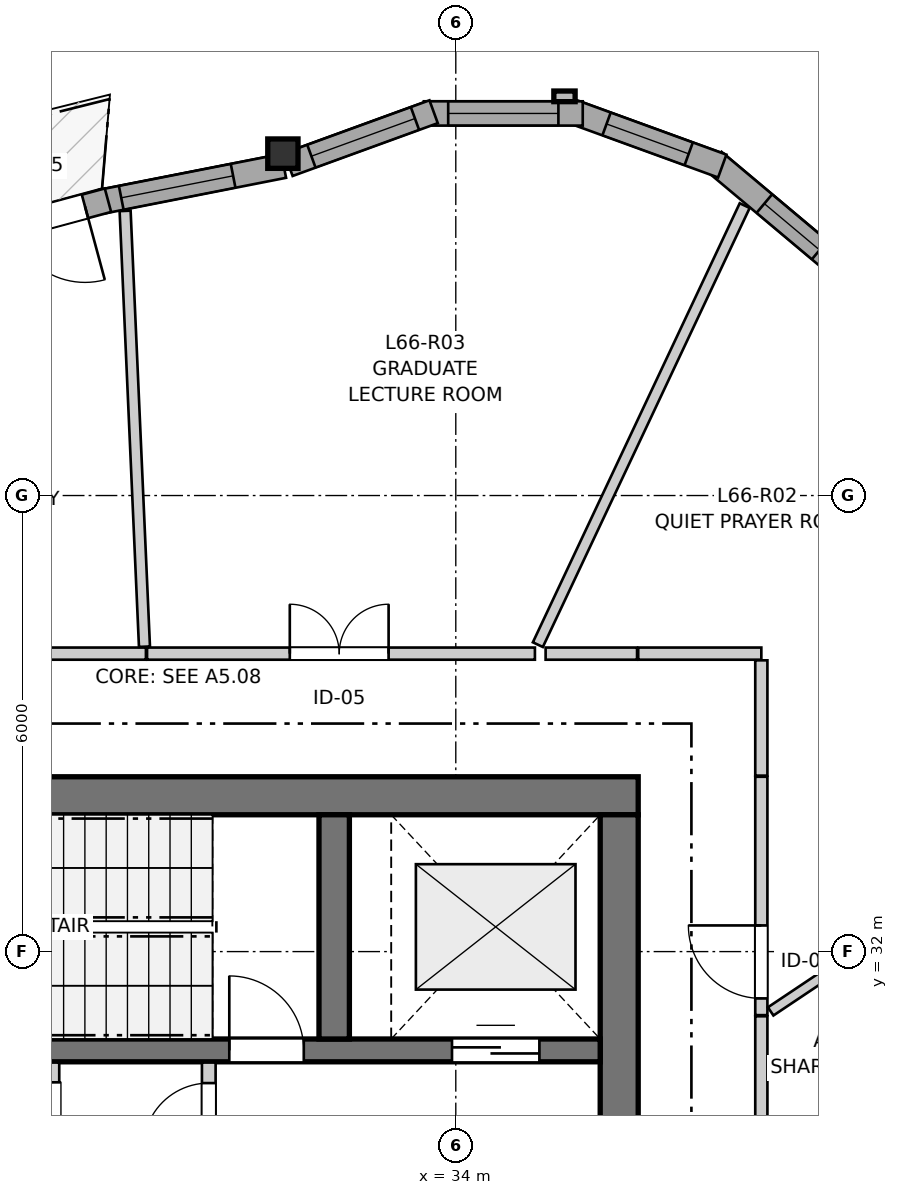
"""IFC4 building model, lengths in metres.
Left out: names, types, materials, properties, quantities, classifications, styles, units other than length and angle.
Written with IfcOpenShell. Run it as: python <this file> out.ifc"""

import sys

from ifc_helpers import new_model, si_unit, direction, frame, frame_2d, origin, origin_2d, place, context, subcontext, project, spatial, rectangle, i_section, extrude, source, transform, mapped, element, fill, save


model = new_model("IFC4")
c1 = context("Model", 3, precision=1e-05, world=origin(), true_north=direction((0.0, 1.0)))
c2 = subcontext(c1, "Body", "Model", "MODEL_VIEW")
j1 = project(units=[si_unit("LENGTHUNIT", "METRE"), si_unit("PLANEANGLEUNIT", "RADIAN")], contexts=[c1])
p1 = place(None, origin())
s1 = spatial("IfcSite", under=j1, at=p1, CompositionType="ELEMENT")
p2 = place(p1, origin())
s2 = spatial("IfcBuilding", under=s1, at=p2, CompositionType="ELEMENT")
p3 = place(p2, frame((0.0, 0.0, 221.2)))
s3 = spatial("IfcBuildingStorey", under=s2, at=p3, CompositionType="ELEMENT", Elevation=221.2)
p4 = place(p3, frame((36.4, 34.05, 0.0), z_axis=(0.0, 0.0, 1.0), x_axis=(-1.0, 0.0, 0.0)))
e1 = element("IfcWall", 1, at=p4, inside=s3, PredefinedType="SHEAR", context=c2, shape_type="SweptSolid", body=[
    extrude(rectangle(XDim=12.1, YDim=0.5, at=frame_2d((6.05, 0.0))), origin(), (0.0, 0.0, 1.0), 2.96),
])
p5 = place(p3, frame((36.15, 18.2, 0.0), z_axis=(0.0, 0.0, 1.0), x_axis=(0.0, 1.0, 0.0)))
e2 = element("IfcWall", 2, at=p5, inside=s3, PredefinedType="SHEAR", context=c2, shape_type="SweptSolid", body=[
    extrude(rectangle(XDim=15.6, YDim=0.5, at=frame_2d((7.8, 0.0))), origin(), (0.0, 0.0, 1.0), 2.96),
])
p6 = place(p5, frame((4.25, 0.0, 0.0)))
e3 = element("IfcOpeningElement", 3, at=p6, cuts=e2, PredefinedType="OPENING", context=c2, shape_type="SweptSolid", body=[
    extrude(rectangle(XDim=1.1, YDim=2.15, at=frame_2d((0.55, 1.075))), frame((0.0, 0.26, 0.0), z_axis=(0.0, -1.0, 0.0), x_axis=(1.0, 0.0, 0.0)), (0.0, 0.0, 1.0), 0.52),
])
p7 = place(p5, frame((10.25, 0.0, 0.0)))
e4 = element("IfcOpeningElement", 4, at=p7, cuts=e2, PredefinedType="OPENING", context=c2, shape_type="SweptSolid", body=[
    extrude(rectangle(XDim=1.1, YDim=2.15, at=frame_2d((0.55, 1.075))), frame((0.0, 0.26, 0.0), z_axis=(0.0, -1.0, 0.0), x_axis=(1.0, 0.0, 0.0)), (0.0, 0.0, 1.0), 0.52),
])
p8 = place(p3, frame((24.8, 30.7, 0.0), z_axis=(0.0, 0.0, 1.0), x_axis=(1.0, 0.0, 0.0)))
e5 = element("IfcWall", 5, at=p8, inside=s3, PredefinedType="SHEAR", context=c2, shape_type="SweptSolid", body=[
    extrude(rectangle(XDim=11.1, YDim=0.3, at=frame_2d((5.55, 0.0))), origin(), (0.0, 0.0, 1.0), 2.96),
])
p9 = place(p8, frame((6.22, 0.0, 0.0)))
e6 = element("IfcOpeningElement", 6, at=p9, cuts=e5, PredefinedType="OPENING", context=c2, shape_type="SweptSolid", body=[
    extrude(rectangle(XDim=0.98, YDim=2.15, at=frame_2d((0.49, 1.075))), frame((0.0, 0.16, 0.0), z_axis=(0.0, -1.0, 0.0), x_axis=(1.0, 0.0, 0.0)), (0.0, 0.0, 1.0), 0.32),
])
p10 = place(p8, frame((9.15, 0.0, 0.0)))
e7 = element("IfcOpeningElement", 7, at=p10, cuts=e5, PredefinedType="OPENING", context=c2, shape_type="SweptSolid", body=[
    extrude(rectangle(XDim=1.15, YDim=2.15, at=frame_2d((0.575, 1.075))), frame((0.0, 0.16, 0.0), z_axis=(0.0, -1.0, 0.0), x_axis=(1.0, 0.0, 0.0)), (0.0, 0.0, 1.0), 0.32),
])
p11 = place(p3, frame((32.4, 30.85, 0.0), z_axis=(0.0, 0.0, 1.0), x_axis=(0.0, 1.0, 0.0)))
e8 = element("IfcWall", 8, at=p11, inside=s3, PredefinedType="SHEAR", context=c2, shape_type="SweptSolid", body=[
    extrude(rectangle(XDim=2.95, YDim=0.4, at=frame_2d((1.475, 0.0))), origin(), (0.0, 0.0, 1.0), 2.96),
])
m1 = source(origin(), c2, "Body", "SweptSolid", [
    extrude(i_section(OverallWidth=0.398, OverallDepth=0.387, WebThickness=0.019, FlangeThickness=0.03, FilletRadius=0.015, at=origin_2d()), origin(), (0.0, 0.0, 1.0), 2.96),
])
p12 = place(p3, frame((31.725, 42.498, 0.0), z_axis=(0.0, 0.0, 1.0), x_axis=(1.0, 0.0, 0.0)))
e9 = element("IfcColumn", 9, at=p12, inside=s3, PredefinedType="PILASTER", context=c2, shape_type="MappedRepresentation", body=[
    mapped(m1, transform((0.0, 0.0, 0.0), x_axis=(1.0, 0.0, 0.0), y_axis=(0.0, 1.0, 0.0), z_axis=(0.0, 0.0, 1.0), scale=1.0)),
])
p13 = place(p3, frame((38.994, 41.056, 0.0), z_axis=(0.0, 0.0, 1.0), x_axis=(-0.766024572719, 0.642811289563, 0.0)))
e10 = element("IfcWall", 10, at=p13, inside=s3, PredefinedType="SOLIDWALL", context=c2, shape_type="SweptSolid", body=[
    extrude(rectangle(XDim=2.09, YDim=0.32, at=frame_2d((1.045, 0.0))), origin(), (0.0, 0.0, 1.0), 2.58),
])
p14 = place(p13, frame((0.271, 0.0, 0.82)))
e11 = element("IfcOpeningElement", 11, at=p14, cuts=e10, PredefinedType="OPENING", context=c2, shape_type="SweptSolid", body=[
    extrude(rectangle(XDim=0.95, YDim=1.35, at=frame_2d((0.475, 0.675))), frame((0.0, 0.17, 0.0), z_axis=(0.0, -1.0, 0.0), x_axis=(1.0, 0.0, 0.0)), (0.0, 0.0, 1.0), 0.34),
])
p15 = place(p3, frame((37.506, 42.334, 0.0), z_axis=(0.0, 0.0, 1.0), x_axis=(-0.939711556618, 0.341968113072, 0.0)))
e12 = element("IfcWall", 12, at=p15, inside=s3, PredefinedType="SOLIDWALL", context=c2, shape_type="SweptSolid", body=[
    extrude(rectangle(XDim=2.09, YDim=0.32, at=frame_2d((1.045, 0.0))), origin(), (0.0, 0.0, 1.0), 2.58),
])
p16 = place(p15, frame((0.47, 0.0, 0.82)))
e13 = element("IfcOpeningElement", 13, at=p16, cuts=e12, PredefinedType="OPENING", context=c2, shape_type="SweptSolid", body=[
    extrude(rectangle(XDim=1.15, YDim=1.2, at=frame_2d((0.575, 0.6))), frame((0.0, 0.17, 0.0), z_axis=(0.0, -1.0, 0.0), x_axis=(1.0, 0.0, 0.0)), (0.0, 0.0, 1.0), 0.34),
])
p17 = place(p3, frame((35.67, 43.027, 0.0), z_axis=(0.0, 0.0, 1.0), x_axis=(-1.0, 0.0, 0.0)))
e14 = element("IfcWall", 14, at=p17, inside=s3, PredefinedType="SOLIDWALL", context=c2, shape_type="SweptSolid", body=[
    extrude(rectangle(XDim=2.09, YDim=0.32, at=frame_2d((1.045, 0.0))), origin(), (0.0, 0.0, 1.0), 2.58),
])
p18 = place(p17, frame((0.32, 0.0, 0.82)))
e15 = element("IfcOpeningElement", 15, at=p18, cuts=e14, PredefinedType="OPENING", context=c2, shape_type="SweptSolid", body=[
    extrude(rectangle(XDim=1.45, YDim=1.25, at=frame_2d((0.725, 0.625))), frame((0.0, 0.17, 0.0), z_axis=(0.0, -1.0, 0.0), x_axis=(1.0, 0.0, 0.0)), (0.0, 0.0, 1.0), 0.34),
])
p19 = place(p3, frame((33.708, 43.049, 0.0), z_axis=(0.0, 0.0, 1.0), x_axis=(-0.939691662178, -0.342022777067, 0.0)))
e16 = element("IfcWall", 16, at=p19, inside=s3, PredefinedType="SOLIDWALL", context=c2, shape_type="SweptSolid", body=[
    extrude(rectangle(XDim=2.032, YDim=0.32, at=frame_2d((1.016, 0.0))), origin(), (0.0, 0.0, 1.0), 2.58),
])
p20 = place(p19, frame((0.261, 0.0, 0.82)))
e17 = element("IfcOpeningElement", 17, at=p20, cuts=e16, PredefinedType="OPENING", context=c2, shape_type="SweptSolid", body=[
    extrude(rectangle(XDim=1.45, YDim=1.25, at=frame_2d((0.725, 0.625))), frame((0.0, 0.17, 0.0), z_axis=(0.0, -1.0, 0.0), x_axis=(1.0, 0.0, 0.0)), (0.0, 0.0, 1.0), 0.34),
])
p21 = place(p3, frame((31.736, 42.337, 0.0), z_axis=(0.0, 0.0, 1.0), x_axis=(-0.981228566979, -0.192848384345, 0.0)))
e18 = element("IfcWall", 18, at=p21, inside=s3, PredefinedType="SOLIDWALL", context=c2, shape_type="SweptSolid", body=[
    extrude(rectangle(XDim=2.443, YDim=0.32, at=frame_2d((1.222, 0.0))), origin(), (0.0, 0.0, 1.0), 2.58),
])
p22 = place(p21, frame((0.679, 0.0, 0.82)))
e19 = element("IfcOpeningElement", 19, at=p22, cuts=e18, PredefinedType="OPENING", context=c2, shape_type="SweptSolid", body=[
    extrude(rectangle(XDim=1.5, YDim=1.45, at=frame_2d((0.75, 0.725))), frame((0.0, 0.17, 0.0), z_axis=(0.0, -1.0, 0.0), x_axis=(1.0, 0.0, 0.0)), (0.0, 0.0, 1.0), 0.34),
])
p23 = place(p3, frame((29.424, 41.885, 0.0), z_axis=(0.0, 0.0, 1.0), x_axis=(-0.965461343217, -0.260546338976, 0.0)))
e20 = element("IfcWall", 20, at=p23, inside=s3, PredefinedType="SOLIDWALL", context=c2, shape_type="SweptSolid", body=[
    extrude(rectangle(XDim=2.323, YDim=0.32, at=frame_2d((1.162, 0.0))), origin(), (0.0, 0.0, 1.0), 2.58),
])
p24 = place(p23, frame((0.313, 0.0, 0.0)))
e21 = element("IfcOpeningElement", 21, at=p24, cuts=e20, PredefinedType="OPENING", context=c2, shape_type="SweptSolid", body=[
    extrude(rectangle(XDim=1.0, YDim=2.1, at=frame_2d((0.5, 1.05))), frame((0.0, 0.17, 0.0), z_axis=(0.0, -1.0, 0.0), x_axis=(1.0, 0.0, 0.0)), (0.0, 0.0, 1.0), 0.34),
])
p25 = place(p3, frame((30.75, 27.43, 0.0), z_axis=(0.0, 0.0, 1.0), x_axis=(0.0, 1.0, 0.0)))
e22 = element("IfcWall", 22, at=p25, inside=s3, PredefinedType="PARTITIONING", context=c2, shape_type="SweptSolid", body=[
    extrude(rectangle(XDim=3.11, YDim=0.18, at=frame_2d((1.555, 0.0))), origin(), (0.0, 0.0, 1.0), 2.96),
])
p26 = place(p25, frame((1.98, 0.0, 0.0)))
e23 = element("IfcOpeningElement", 23, at=p26, cuts=e22, PredefinedType="OPENING", context=c2, shape_type="SweptSolid", body=[
    extrude(rectangle(XDim=0.86, YDim=2.05, at=frame_2d((0.43, 1.025))), frame((0.0, 0.1, 0.0), z_axis=(0.0, -1.0, 0.0), x_axis=(1.0, 0.0, 0.0)), (0.0, 0.0, 1.0), 0.2),
])
p27 = place(p3, frame((28.725, 29.16, 0.0), z_axis=(0.0, 0.0, 1.0), x_axis=(0.0, 1.0, 0.0)))
e24 = element("IfcWall", 24, at=p27, inside=s3, PredefinedType="PARTITIONING", context=c2, shape_type="SweptSolid", body=[
    extrude(rectangle(XDim=1.38, YDim=0.115, at=frame_2d((0.69, 0.0))), origin(), (0.0, 0.0, 1.0), 2.96),
])
p28 = place(p27, frame((0.26, 0.0, 0.0)))
e25 = element("IfcOpeningElement", 25, at=p28, cuts=e24, PredefinedType="OPENING", context=c2, shape_type="SweptSolid", body=[
    extrude(rectangle(XDim=0.86, YDim=2.05, at=frame_2d((0.43, 1.025))), frame((0.0, 0.067, 0.0), z_axis=(0.0, -1.0, 0.0), x_axis=(1.0, 0.0, 0.0)), (0.0, 0.0, 1.0), 0.135),
])
p29 = place(p3, frame((24.3, 35.92, 0.0), z_axis=(0.0, 0.0, 1.0), x_axis=(1.0, 0.0, 0.0)))
e26 = element("IfcWall", 26, at=p29, inside=s3, PredefinedType="PARTITIONING", context=c2, shape_type="SweptSolid", body=[
    extrude(rectangle(XDim=5.623, YDim=0.16, at=frame_2d((2.812, 0.0))), origin(), (0.0, 0.0, 1.0), 2.96),
])
p30 = place(p29, frame((0.22, 0.0, 0.0)))
e27 = element("IfcOpeningElement", 27, at=p30, cuts=e26, PredefinedType="OPENING", context=c2, shape_type="SweptSolid", body=[
    extrude(rectangle(XDim=0.96, YDim=2.1, at=frame_2d((0.48, 1.05))), frame((0.0, 0.09, 0.0), z_axis=(0.0, -1.0, 0.0), x_axis=(1.0, 0.0, 0.0)), (0.0, 0.0, 1.0), 0.18),
])
p31 = place(p3, frame((29.938, 35.92, 0.0), z_axis=(0.0, 0.0, 1.0), x_axis=(1.0, 0.0, 0.0)))
e28 = element("IfcWall", 28, at=p31, inside=s3, PredefinedType="PARTITIONING", context=c2, shape_type="SweptSolid", body=[
    extrude(rectangle(XDim=5.103, YDim=0.16, at=frame_2d((2.552, 0.0))), origin(), (0.0, 0.0, 1.0), 2.96),
])
p32 = place(p31, frame((1.878, 0.0, 0.0)))
e29 = element("IfcOpeningElement", 29, at=p32, cuts=e28, PredefinedType="OPENING", context=c2, shape_type="SweptSolid", body=[
    extrude(rectangle(XDim=1.3, YDim=2.1, at=frame_2d((0.65, 1.05))), frame((0.0, 0.09, 0.0), z_axis=(0.0, -1.0, 0.0), x_axis=(1.0, 0.0, 0.0)), (0.0, 0.0, 1.0), 0.18),
])
p33 = place(p3, frame((38.02, 31.149, 0.0), z_axis=(0.0, 0.0, 1.0), x_axis=(0.0, -1.0, 0.0)))
e30 = element("IfcWall", 30, at=p33, inside=s3, PredefinedType="PARTITIONING", context=c2, shape_type="SweptSolid", body=[
    extrude(rectangle(XDim=3.279, YDim=0.16, at=frame_2d((1.639, 0.0))), origin(), (0.0, 0.0, 1.0), 2.628),
])
p34 = place(p33, frame((2.109, 0.0, 0.0)))
e31 = element("IfcOpeningElement", 31, at=p34, cuts=e30, PredefinedType="OPENING", context=c2, shape_type="SweptSolid", body=[
    extrude(rectangle(XDim=0.95, YDim=2.1, at=frame_2d((0.475, 1.05))), frame((0.0, 0.09, 0.0), z_axis=(0.0, -1.0, 0.0), x_axis=(1.0, 0.0, 0.0)), (0.0, 0.0, 1.0), 0.18),
])
p35 = place(p3, frame((38.02, 31.164, 0.0), z_axis=(0.0, 0.0, 1.0), x_axis=(0.0, 1.0, 0.0)))
e32 = element("IfcWall", 32, at=p35, inside=s3, PredefinedType="PARTITIONING", context=c2, shape_type="SweptSolid", body=[
    extrude(rectangle(XDim=3.136, YDim=0.16, at=frame_2d((1.568, 0.0))), origin(), (0.0, 0.0, 1.0), 2.628),
])
p36 = place(p35, frame((0.22, 0.0, 0.0)))
e33 = element("IfcOpeningElement", 33, at=p36, cuts=e32, PredefinedType="OPENING", context=c2, shape_type="SweptSolid", body=[
    extrude(rectangle(XDim=0.96, YDim=2.1, at=frame_2d((0.48, 1.05))), frame((0.0, 0.09, 0.0), z_axis=(0.0, -1.0, 0.0), x_axis=(1.0, 0.0, 0.0)), (0.0, 0.0, 1.0), 0.18),
])
p37 = place(p3, frame((35.08, 36.038, 0.0), z_axis=(0.0, 0.0, 1.0), x_axis=(0.426214985607, 0.904621902258, 0.0)))
e34 = element("IfcWall", 34, at=p37, inside=s3, PredefinedType="PARTITIONING", context=c2, shape_type="SweptSolid", body=[
    extrude(rectangle(XDim=6.385, YDim=0.145, at=frame_2d((3.192, 0.0))), origin(), (0.0, 0.0, 1.0), 2.96),
])
p38 = place(p3, frame((29.649, 41.745, 0.0), z_axis=(0.0, 0.0, 1.0), x_axis=(0.044327022296, -0.999017074476, 0.0)))
e35 = element("IfcWall", 35, at=p38, inside=s3, PredefinedType="PARTITIONING", context=c2, shape_type="SweptSolid", body=[
    extrude(rectangle(XDim=5.739, YDim=0.145, at=frame_2d((2.87, 0.0))), origin(), (0.0, 0.0, 1.0), 2.96),
])
p39 = place(p3, frame((38.143, 31.213, 0.0), z_axis=(0.0, 0.0, 1.0), x_axis=(0.831154063558, 0.556042195009, 0.0)))
e36 = element("IfcWall", 36, at=p39, inside=s3, PredefinedType="PARTITIONING", context=c2, shape_type="SweptSolid", body=[
    extrude(rectangle(XDim=3.86, YDim=0.13, at=frame_2d((1.93, 0.0))), origin(), (0.0, 0.0, 1.0), 2.96),
])
p40 = place(p3, frame((36.4, 35.92, 0.0), z_axis=(0.0, 0.0, 1.0), x_axis=(1.0, 0.0, 0.0)))
e37 = element("IfcWall", 37, at=p40, inside=s3, PredefinedType="PARTITIONING", context=c2, shape_type="SweptSolid", body=[
    extrude(rectangle(XDim=1.62, YDim=0.16, at=frame_2d((0.81, 0.0))), origin(), (0.0, 0.0, 1.0), 2.598),
])
p41 = place(p3, frame((38.02, 34.315, 0.0), z_axis=(0.0, 0.0, 1.0), x_axis=(0.0, 1.0, 0.0)))
e38 = element("IfcWall", 38, at=p41, inside=s3, PredefinedType="PARTITIONING", context=c2, shape_type="SweptSolid", body=[
    extrude(rectangle(XDim=1.517, YDim=0.16, at=frame_2d((0.759, 0.0))), origin(), (0.0, 0.0, 1.0), 2.96),
])
p42 = place(p3, frame((35.182, 35.92, 0.0), z_axis=(0.0, 0.0, 1.0), x_axis=(1.0, 0.0, 0.0)))
e39 = element("IfcWall", 39, at=p42, inside=s3, PredefinedType="PARTITIONING", context=c2, shape_type="SweptSolid", body=[
    extrude(rectangle(XDim=1.203, YDim=0.16, at=frame_2d((0.602, 0.0))), origin(), (0.0, 0.0, 1.0), 2.598),
])
m2 = source(origin(), c2, "Body", "SweptSolid", [
    extrude(rectangle(XDim=0.95, YDim=1.35, at=frame_2d((0.475, 0.675))), frame((0.0, 0.03, 0.0), z_axis=(0.0, -1.0, 0.0), x_axis=(1.0, 0.0, 0.0)), (0.0, 0.0, 1.0), 0.06),
])
p43 = place(p14, origin())
e40 = element("IfcWindow", 40, at=p43, inside=s3, PartitioningType="SINGLE_PANEL", PredefinedType="WINDOW", context=c2, shape_type="MappedRepresentation", body=[
    mapped(m2, transform((0.0, 0.0, 0.0), x_axis=(1.0, 0.0, 0.0), y_axis=(0.0, 1.0, 0.0), z_axis=(0.0, 0.0, 1.0), scale=1.0)),
])
fill(e11, e40)
m3 = source(origin(), c2, "Body", "SweptSolid", [
    extrude(rectangle(XDim=1.15, YDim=1.2, at=frame_2d((0.575, 0.6))), frame((0.0, 0.03, 0.0), z_axis=(0.0, -1.0, 0.0), x_axis=(1.0, 0.0, 0.0)), (0.0, 0.0, 1.0), 0.06),
])
p44 = place(p16, origin())
e41 = element("IfcWindow", 41, at=p44, inside=s3, PartitioningType="SINGLE_PANEL", PredefinedType="WINDOW", context=c2, shape_type="MappedRepresentation", body=[
    mapped(m3, transform((0.0, 0.0, 0.0), x_axis=(1.0, 0.0, 0.0), y_axis=(0.0, 1.0, 0.0), z_axis=(0.0, 0.0, 1.0), scale=1.0)),
])
fill(e13, e41)
m4 = source(origin(), c2, "Body", "SweptSolid", [
    extrude(rectangle(XDim=1.45, YDim=1.25, at=frame_2d((0.725, 0.625))), frame((0.0, 0.03, 0.0), z_axis=(0.0, -1.0, 0.0), x_axis=(1.0, 0.0, 0.0)), (0.0, 0.0, 1.0), 0.06),
])
p45 = place(p18, origin())
e42 = element("IfcWindow", 42, at=p45, inside=s3, PartitioningType="SINGLE_PANEL", PredefinedType="WINDOW", context=c2, shape_type="MappedRepresentation", body=[
    mapped(m4, transform((0.0, 0.0, 0.0), x_axis=(1.0, 0.0, 0.0), y_axis=(0.0, 1.0, 0.0), z_axis=(0.0, 0.0, 1.0), scale=1.0)),
])
fill(e15, e42)
p46 = place(p20, origin())
e43 = element("IfcWindow", 43, at=p46, inside=s3, PartitioningType="SINGLE_PANEL", PredefinedType="WINDOW", context=c2, shape_type="MappedRepresentation", body=[
    mapped(m4, transform((0.0, 0.0, 0.0), x_axis=(1.0, 0.0, 0.0), y_axis=(0.0, 1.0, 0.0), z_axis=(0.0, 0.0, 1.0), scale=1.0)),
])
fill(e17, e43)
m5 = source(origin(), c2, "Body", "SweptSolid", [
    extrude(rectangle(XDim=1.5, YDim=1.45, at=frame_2d((0.75, 0.725))), frame((0.0, 0.03, 0.0), z_axis=(0.0, -1.0, 0.0), x_axis=(1.0, 0.0, 0.0)), (0.0, 0.0, 1.0), 0.06),
])
p47 = place(p22, origin())
e44 = element("IfcWindow", 44, at=p47, inside=s3, PartitioningType="SINGLE_PANEL", PredefinedType="WINDOW", context=c2, shape_type="MappedRepresentation", body=[
    mapped(m5, transform((0.0, 0.0, 0.0), x_axis=(1.0, 0.0, 0.0), y_axis=(0.0, 1.0, 0.0), z_axis=(0.0, 0.0, 1.0), scale=1.0)),
])
fill(e19, e44)
m6 = source(origin(), c2, "Body", "SweptSolid", [
    extrude(rectangle(XDim=1.0, YDim=2.1, at=frame_2d((0.5, 1.05))), frame((0.0, 0.025, 0.0), z_axis=(0.0, -1.0, 0.0), x_axis=(1.0, 0.0, 0.0)), (0.0, 0.0, 1.0), 0.05),
])
p48 = place(p24, origin())
e45 = element("IfcDoor", 45, at=p48, inside=s3, OperationType="SINGLE_SWING_LEFT", PredefinedType="DOOR", context=c2, shape_type="MappedRepresentation", body=[
    mapped(m6, transform((0.0, 0.0, 0.0), x_axis=(1.0, 0.0, 0.0), y_axis=(0.0, 1.0, 0.0), z_axis=(0.0, 0.0, 1.0), scale=1.0)),
])
fill(e21, e45)
m7 = source(origin(), c2, "Body", "SweptSolid", [
    extrude(rectangle(XDim=0.98, YDim=2.15, at=frame_2d((0.49, 1.075))), frame((0.0, 0.025, 0.0), z_axis=(0.0, -1.0, 0.0), x_axis=(1.0, 0.0, 0.0)), (0.0, 0.0, 1.0), 0.05),
])
p49 = place(p9, origin())
e46 = element("IfcDoor", 46, at=p49, inside=s3, OperationType="SINGLE_SWING_LEFT", PredefinedType="DOOR", context=c2, shape_type="MappedRepresentation", body=[
    mapped(m7, transform((0.0, 0.0, 0.0), x_axis=(1.0, 0.0, 0.0), y_axis=(0.0, 1.0, 0.0), z_axis=(0.0, 0.0, 1.0), scale=1.0)),
])
fill(e6, e46)
m8 = source(origin(), c2, "Body", "SweptSolid", [
    extrude(rectangle(XDim=1.15, YDim=2.15, at=frame_2d((0.575, 1.075))), frame((0.0, 0.025, 0.0), z_axis=(0.0, -1.0, 0.0), x_axis=(1.0, 0.0, 0.0)), (0.0, 0.0, 1.0), 0.05),
])
p50 = place(p10, origin())
e47 = element("IfcDoor", 47, at=p50, inside=s3, OperationType="DOUBLE_DOOR_SLIDING", PredefinedType="DOOR", context=c2, shape_type="MappedRepresentation", body=[
    mapped(m8, transform((0.0, 0.0, 0.0), x_axis=(1.0, 0.0, 0.0), y_axis=(0.0, 1.0, 0.0), z_axis=(0.0, 0.0, 1.0), scale=1.0)),
])
fill(e7, e47)
m9 = source(origin(), c2, "Body", "SweptSolid", [
    extrude(rectangle(XDim=0.86, YDim=2.05, at=frame_2d((0.43, 1.025))), frame((0.0, 0.025, 0.0), z_axis=(0.0, -1.0, 0.0), x_axis=(1.0, 0.0, 0.0)), (0.0, 0.0, 1.0), 0.05),
])
p51 = place(p26, origin())
e48 = element("IfcDoor", 48, at=p51, inside=s3, OperationType="SINGLE_SWING_LEFT", PredefinedType="DOOR", context=c2, shape_type="MappedRepresentation", body=[
    mapped(m9, transform((0.0, 0.0, 0.0), x_axis=(1.0, 0.0, 0.0), y_axis=(0.0, 1.0, 0.0), z_axis=(0.0, 0.0, 1.0), scale=1.0)),
])
fill(e23, e48)
p52 = place(p28, origin())
e49 = element("IfcDoor", 49, at=p52, inside=s3, OperationType="SINGLE_SWING_LEFT", PredefinedType="DOOR", context=c2, shape_type="MappedRepresentation", body=[
    mapped(m9, transform((0.0, 0.0, 0.0), x_axis=(1.0, 0.0, 0.0), y_axis=(0.0, 1.0, 0.0), z_axis=(0.0, 0.0, 1.0), scale=1.0)),
])
fill(e25, e49)
m10 = source(origin(), c2, "Body", "SweptSolid", [
    extrude(rectangle(XDim=1.3, YDim=2.1, at=frame_2d((0.65, 1.05))), frame((0.0, 0.025, 0.0), z_axis=(0.0, -1.0, 0.0), x_axis=(1.0, 0.0, 0.0)), (0.0, 0.0, 1.0), 0.05),
])
p53 = place(p32, origin())
e50 = element("IfcDoor", 50, at=p53, inside=s3, OperationType="DOUBLE_DOOR_SINGLE_SWING", PredefinedType="DOOR", context=c2, shape_type="MappedRepresentation", body=[
    mapped(m10, transform((0.0, 0.0, 0.0), x_axis=(1.0, 0.0, 0.0), y_axis=(0.0, 1.0, 0.0), z_axis=(0.0, 0.0, 1.0), scale=1.0)),
])
fill(e29, e50)
m11 = source(origin(), c2, "Body", "SweptSolid", [
    extrude(rectangle(XDim=0.96, YDim=2.1, at=frame_2d((0.48, 1.05))), frame((0.0, 0.025, 0.0), z_axis=(0.0, -1.0, 0.0), x_axis=(1.0, 0.0, 0.0)), (0.0, 0.0, 1.0), 0.05),
])
p54 = place(p36, origin())
e51 = element("IfcDoor", 51, at=p54, inside=s3, OperationType="SINGLE_SWING_RIGHT", PredefinedType="DOOR", context=c2, shape_type="MappedRepresentation", body=[
    mapped(m11, transform((0.0, 0.0, 0.0), x_axis=(1.0, 0.0, 0.0), y_axis=(0.0, 1.0, 0.0), z_axis=(0.0, 0.0, 1.0), scale=1.0)),
])
fill(e33, e51)
save(model, sys.argv[1])
